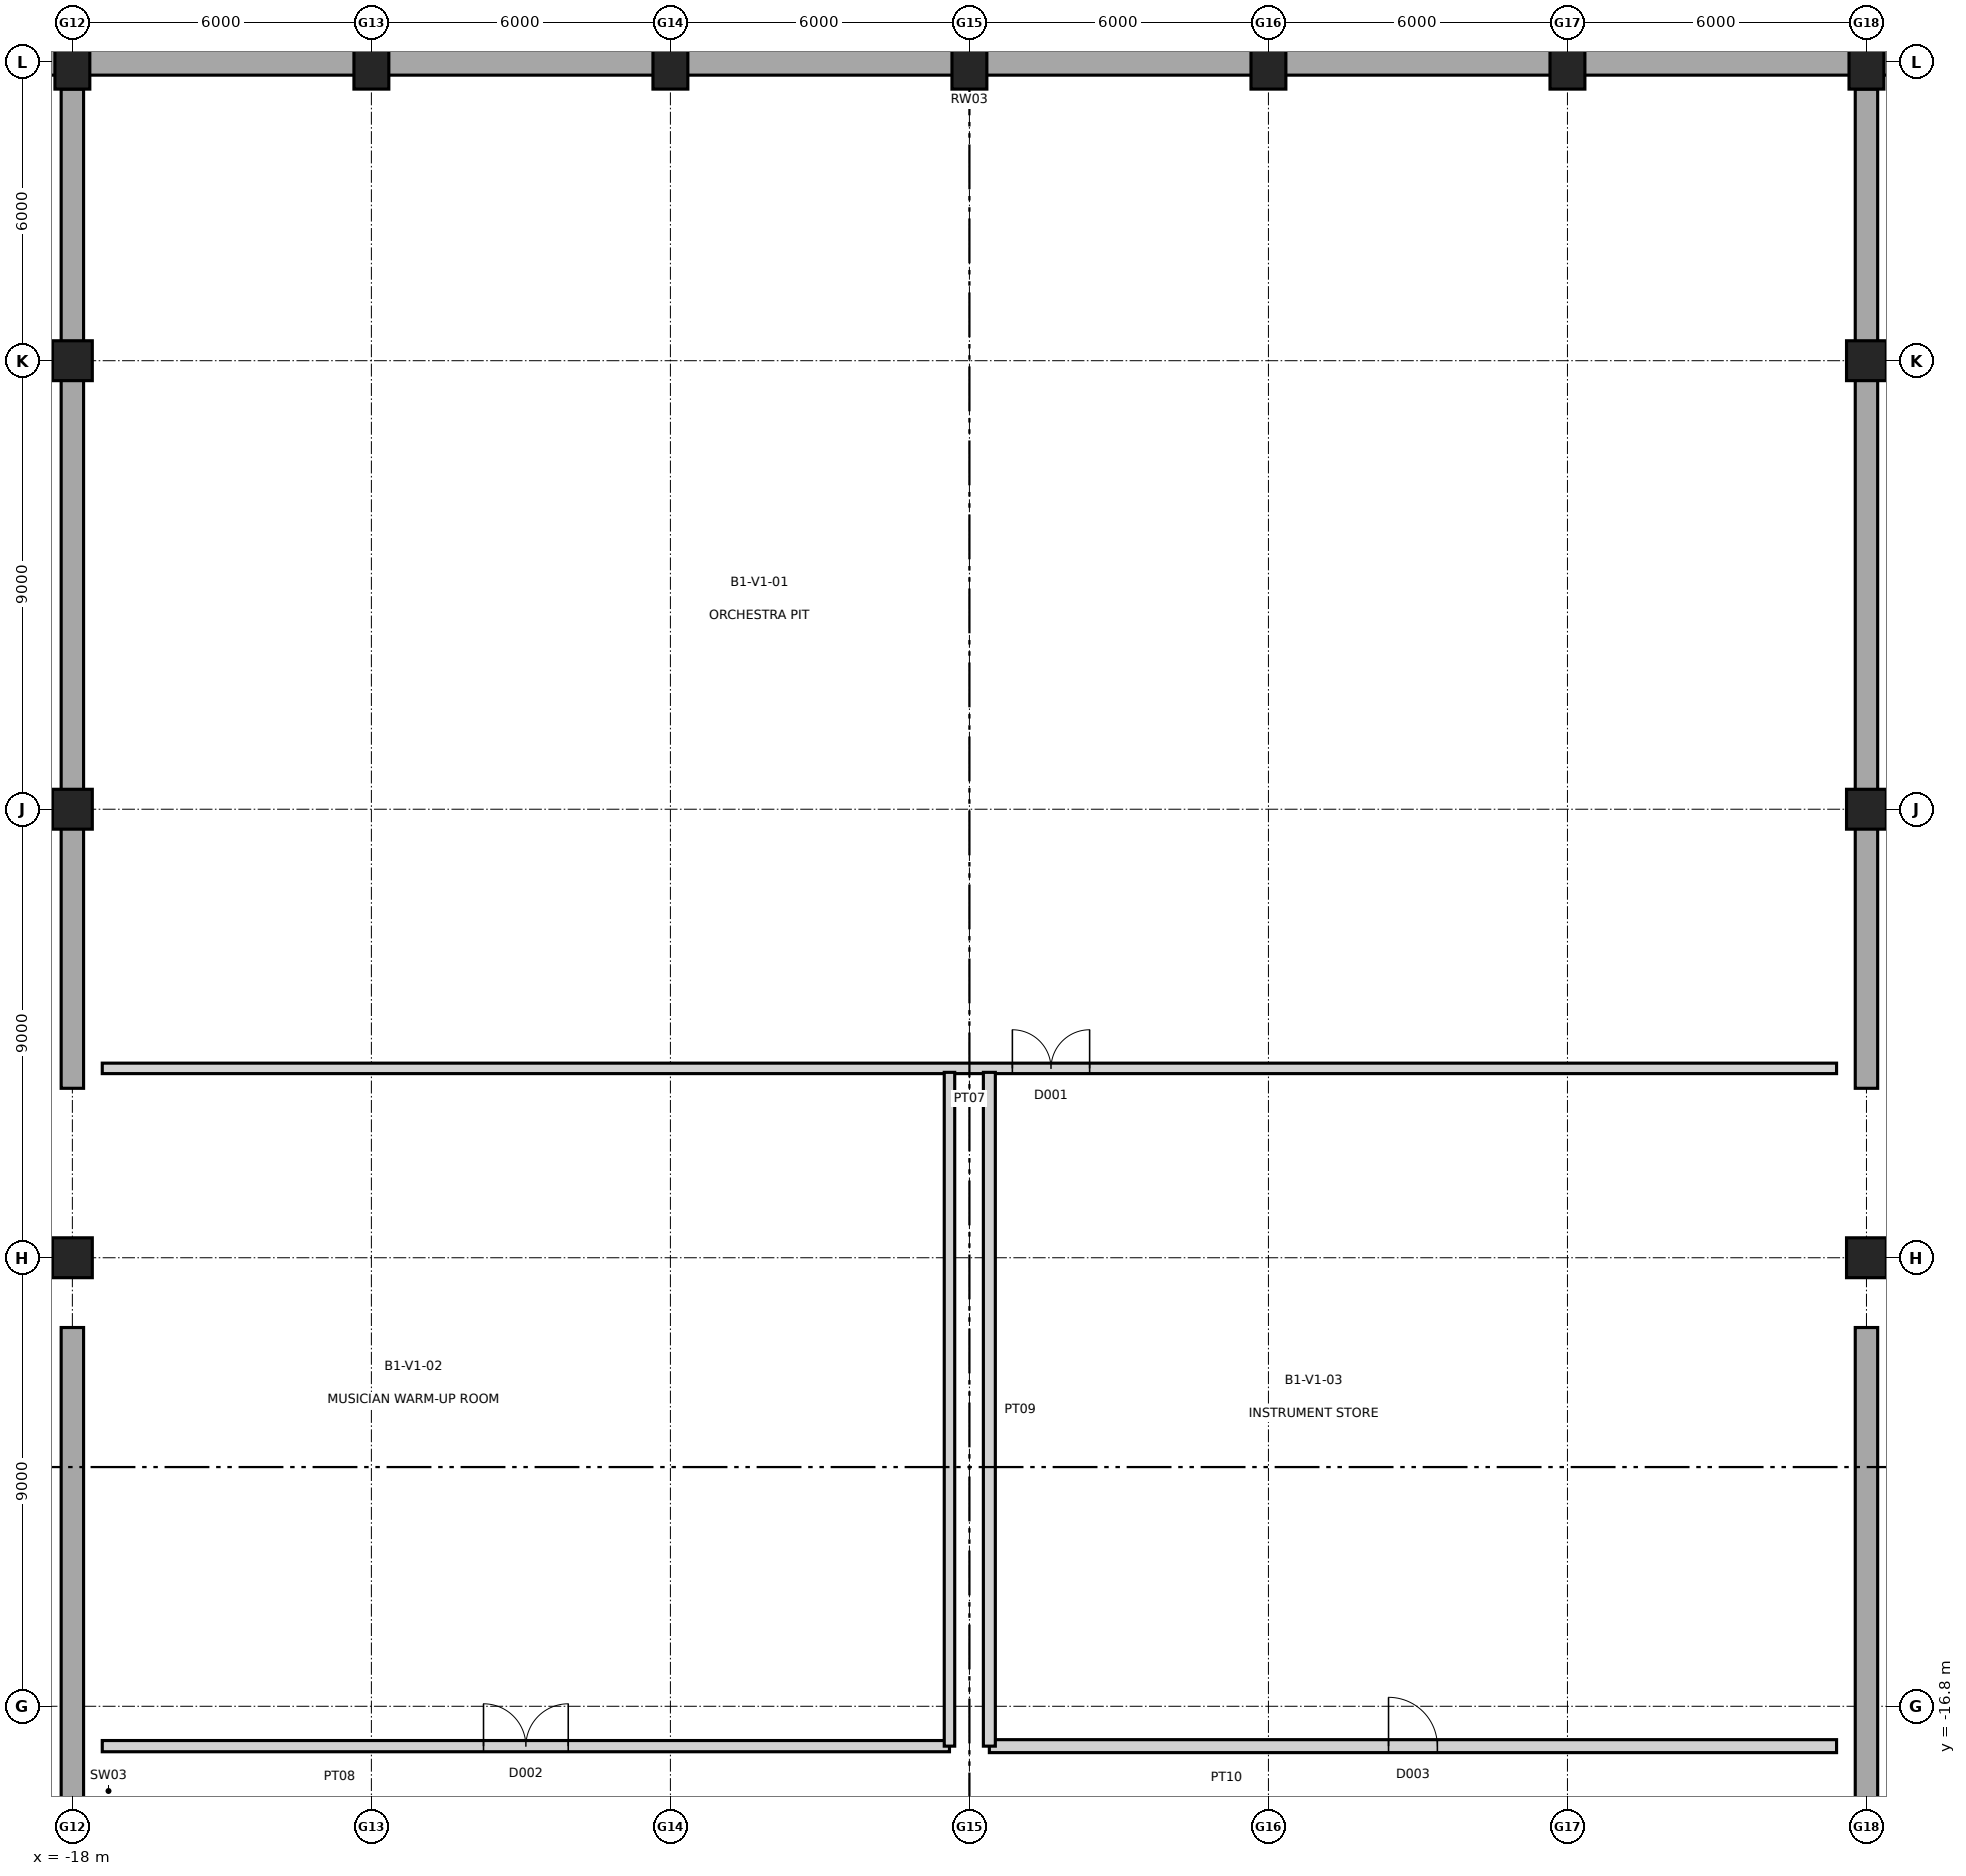
"""IFC4 building model, lengths in metres.
Left out: names, types, materials, properties, quantities, classifications, styles, units other than length and angle.
Written with IfcOpenShell. Run it as: python <this file> out.ifc"""

import sys

from ifc_helpers import new_model, si_unit, direction, frame, frame_2d, origin, origin_2d, place, context, subcontext, project, spatial, rectangle, extrude, element, fill, save


model = new_model("IFC4")
c1 = context("Model", 3, precision=1e-05, world=origin(), true_north=direction((0.0, 1.0)))
c2 = subcontext(c1, "Body", "Model", "MODEL_VIEW")
j1 = project(units=[si_unit("LENGTHUNIT", "METRE"), si_unit("PLANEANGLEUNIT", "RADIAN")], contexts=[c1])
p1 = place(None, origin())
s1 = spatial("IfcSite", under=j1, at=p1, CompositionType="ELEMENT")
p2 = place(p1, origin())
s2 = spatial("IfcBuilding", under=s1, at=p2, CompositionType="ELEMENT")
p3 = place(p2, frame((0.0, 0.0, -5.4)))
s3 = spatial("IfcBuildingStorey", under=s2, at=p3, CompositionType="ELEMENT", Elevation=-5.4)
for number, where, z_axis, x_axis in (
    (1, (-18.0, -7.8, 0.0), (0.0, 0.0, 1.0), (1.0, 0.0, 0.0)),
    (2, (-18.0, 1.2, 0.0), (0.0, 0.0, 1.0), (1.0, 0.0, 0.0)),
    (3, (-18.0, 10.2, 0.0), (0.0, 0.0, 1.0), (1.0, 0.0, 0.0)),
):
    element("IfcColumn", number, at=place(p3, frame(where, z_axis=z_axis, x_axis=x_axis)), inside=s3, PredefinedType="COLUMN", context=c2, shape_type="SweptSolid", body=[
        extrude(rectangle(XDim=0.8, YDim=0.8, at=origin_2d()), origin(), (0.0, 0.0, 1.0), 5.4),
    ])
for number, where, z_axis, x_axis in (
    (4, (-18.0, 16.2, 0.0), (0.0, 0.0, 1.0), (1.0, 0.0, 0.0)),
    (5, (-12.0, 16.2, 0.0), (0.0, 0.0, 1.0), (1.0, 0.0, 0.0)),
    (6, (-6.0, 16.2, 0.0), (0.0, 0.0, 1.0), (1.0, 0.0, 0.0)),
    (7, (0.0, 16.2, 0.0), (0.0, 0.0, 1.0), (1.0, 0.0, 0.0)),
    (8, (6.0, 16.2, 0.0), (0.0, 0.0, 1.0), (1.0, 0.0, 0.0)),
    (9, (12.0, 16.2, 0.0), (0.0, 0.0, 1.0), (1.0, 0.0, 0.0)),
):
    element("IfcColumn", number, at=place(p3, frame(where, z_axis=z_axis, x_axis=x_axis)), inside=s3, PredefinedType="COLUMN", context=c2, shape_type="SweptSolid", body=[
        extrude(rectangle(XDim=0.7, YDim=1.1, at=origin_2d()), origin(), (0.0, 0.0, 1.0), 5.4),
    ])
for number, where, z_axis, x_axis in (
    (10, (18.0, -7.8, 0.0), (0.0, 0.0, 1.0), (1.0, 0.0, 0.0)),
    (11, (18.0, 1.2, 0.0), (0.0, 0.0, 1.0), (1.0, 0.0, 0.0)),
    (12, (18.0, 10.2, 0.0), (0.0, 0.0, 1.0), (1.0, 0.0, 0.0)),
):
    element("IfcColumn", number, at=place(p3, frame(where, z_axis=z_axis, x_axis=x_axis)), inside=s3, PredefinedType="COLUMN", context=c2, shape_type="SweptSolid", body=[
        extrude(rectangle(XDim=0.8, YDim=0.8, at=origin_2d()), origin(), (0.0, 0.0, 1.0), 5.4),
    ])
p4 = place(p3, frame((18.0, 16.2, 0.0), z_axis=(0.0, 0.0, 1.0), x_axis=(1.0, 0.0, 0.0)))
e13 = element("IfcColumn", 13, at=p4, inside=s3, PredefinedType="COLUMN", context=c2, shape_type="SweptSolid", body=[
    extrude(rectangle(XDim=0.7, YDim=1.1, at=origin_2d()), origin(), (0.0, 0.0, 1.0), 5.4),
])
p5 = place(p3, frame((-29.0, 16.2, 0.0), z_axis=(0.0, 0.0, 1.0), x_axis=(1.0, 0.0, 0.0)))
e14 = element("IfcWall", 14, at=p5, inside=s3, PredefinedType="USERDEFINED", context=c2, shape_type="SweptSolid", body=[
    extrude(rectangle(XDim=58.0, YDim=0.54, at=frame_2d((29.0, 0.0))), origin(), (0.0, 0.0, 1.0), 5.11),
])
p6 = place(p3, frame((-18.0, -27.8, 0.0), z_axis=(0.0, 0.0, 1.0), x_axis=(0.0, 1.0, 0.0)))
e15 = element("IfcWall", 15, at=p6, inside=s3, PredefinedType="SHEAR", context=c2, shape_type="SweptSolid", body=[
    extrude(rectangle(XDim=18.6, YDim=0.45, at=frame_2d((9.3, 0.0))), origin(), (0.0, 0.0, 1.0), 5.4),
])
p7 = place(p3, frame((-18.0, -4.4, 0.0), z_axis=(0.0, 0.0, 1.0), x_axis=(0.0, 1.0, 0.0)))
e16 = element("IfcWall", 16, at=p7, inside=s3, PredefinedType="SHEAR", context=c2, shape_type="SweptSolid", body=[
    extrude(rectangle(XDim=20.05, YDim=0.45, at=frame_2d((10.025, 0.0))), origin(), (0.0, 0.0, 1.0), 5.4),
])
p8 = place(p3, frame((18.0, -27.8, 0.0), z_axis=(0.0, 0.0, 1.0), x_axis=(0.0, 1.0, 0.0)))
e17 = element("IfcWall", 17, at=p8, inside=s3, PredefinedType="SHEAR", context=c2, shape_type="SweptSolid", body=[
    extrude(rectangle(XDim=18.6, YDim=0.45, at=frame_2d((9.3, 0.0))), origin(), (0.0, 0.0, 1.0), 5.4),
])
p9 = place(p3, frame((18.0, -4.4, 0.0), z_axis=(0.0, 0.0, 1.0), x_axis=(0.0, 1.0, 0.0)))
e18 = element("IfcWall", 18, at=p9, inside=s3, PredefinedType="SHEAR", context=c2, shape_type="SweptSolid", body=[
    extrude(rectangle(XDim=20.05, YDim=0.45, at=frame_2d((10.025, 0.0))), origin(), (0.0, 0.0, 1.0), 5.4),
])
p10 = place(p3, frame((-17.4, -4.0, 0.0), z_axis=(0.0, 0.0, 1.0), x_axis=(1.0, 0.0, 0.0)))
e19 = element("IfcWall", 19, at=p10, inside=s3, PredefinedType="PARTITIONING", context=c2, shape_type="SweptSolid", body=[
    extrude(rectangle(XDim=34.8, YDim=0.21, at=frame_2d((17.4, 0.0))), origin(), (0.0, 0.0, 1.0), 5.02),
])
p11 = place(p10, frame((18.262, 0.0, 0.0)))
e20 = element("IfcOpeningElement", 20, at=p11, cuts=e19, PredefinedType="OPENING", context=c2, shape_type="SweptSolid", body=[
    extrude(rectangle(XDim=1.55, YDim=2.2, at=frame_2d((0.775, 1.1))), frame((0.0, 0.115, 0.0), z_axis=(0.0, -1.0, 0.0), x_axis=(1.0, 0.0, 0.0)), (0.0, 0.0, 1.0), 0.23),
])
p12 = place(p3, frame((-17.4, -17.6, 0.0), z_axis=(0.0, 0.0, 1.0), x_axis=(1.0, 0.0, 0.0)))
e21 = element("IfcWall", 21, at=p12, inside=s3, PredefinedType="PARTITIONING", context=c2, shape_type="SweptSolid", body=[
    extrude(rectangle(XDim=17.0, YDim=0.225, at=frame_2d((8.5, 0.0))), origin(), (0.0, 0.0, 1.0), 5.02),
])
p13 = place(p12, frame((7.65, 0.0, 0.0)))
e22 = element("IfcOpeningElement", 22, at=p13, cuts=e21, PredefinedType="OPENING", context=c2, shape_type="SweptSolid", body=[
    extrude(rectangle(XDim=1.7, YDim=2.25, at=frame_2d((0.85, 1.125))), frame((0.0, 0.123, 0.0), z_axis=(0.0, -1.0, 0.0), x_axis=(1.0, 0.0, 0.0)), (0.0, 0.0, 1.0), 0.245),
])
p14 = place(p3, frame((-0.4, -17.6, 0.0), z_axis=(0.0, 0.0, 1.0), x_axis=(0.0, 1.0, 0.0)))
e23 = element("IfcWall", 23, at=p14, inside=s3, PredefinedType="PARTITIONING", context=c2, shape_type="SweptSolid", body=[
    extrude(rectangle(XDim=13.52, YDim=0.21, at=frame_2d((6.76, 0.0))), origin(), (0.0, 0.0, 1.0), 5.02),
])
p15 = place(p3, frame((0.4, -17.6, 0.0), z_axis=(0.0, 0.0, 1.0), x_axis=(1.0, 0.0, 0.0)))
e24 = element("IfcWall", 24, at=p15, inside=s3, PredefinedType="PARTITIONING", context=c2, shape_type="SweptSolid", body=[
    extrude(rectangle(XDim=17.0, YDim=0.26, at=frame_2d((8.5, 0.0))), origin(), (0.0, 0.0, 1.0), 5.02),
])
p16 = place(p15, frame((8.01, 0.0, 0.0)))
e25 = element("IfcOpeningElement", 25, at=p16, cuts=e24, PredefinedType="OPENING", context=c2, shape_type="SweptSolid", body=[
    extrude(rectangle(XDim=0.98, YDim=2.15, at=frame_2d((0.49, 1.075))), frame((0.0, 0.14, 0.0), z_axis=(0.0, -1.0, 0.0), x_axis=(1.0, 0.0, 0.0)), (0.0, 0.0, 1.0), 0.28),
])
p17 = place(p3, frame((0.4, -17.6, 0.0), z_axis=(0.0, 0.0, 1.0), x_axis=(0.0, 1.0, 0.0)))
e26 = element("IfcWall", 26, at=p17, inside=s3, PredefinedType="PARTITIONING", context=c2, shape_type="SweptSolid", body=[
    extrude(rectangle(XDim=13.52, YDim=0.24, at=frame_2d((6.76, 0.0))), origin(), (0.0, 0.0, 1.0), 5.02),
])
p18 = place(p11, origin())
e27 = element("IfcDoor", 27, at=p18, inside=s3, OperationType="DOUBLE_DOOR_SINGLE_SWING", PredefinedType="DOOR", context=c2, shape_type="SweptSolid", body=[
    extrude(rectangle(XDim=1.55, YDim=2.2, at=frame_2d((0.775, 1.1))), frame((0.0, 0.025, 0.0), z_axis=(0.0, -1.0, 0.0), x_axis=(1.0, 0.0, 0.0)), (0.0, 0.0, 1.0), 0.05),
])
fill(e20, e27)
p19 = place(p13, origin())
e28 = element("IfcDoor", 28, at=p19, inside=s3, OperationType="DOUBLE_DOOR_SINGLE_SWING", PredefinedType="DOOR", context=c2, shape_type="SweptSolid", body=[
    extrude(rectangle(XDim=1.7, YDim=2.25, at=frame_2d((0.85, 1.125))), frame((0.0, 0.025, 0.0), z_axis=(0.0, -1.0, 0.0), x_axis=(1.0, 0.0, 0.0)), (0.0, 0.0, 1.0), 0.05),
])
fill(e22, e28)
p20 = place(p16, origin())
e29 = element("IfcDoor", 29, at=p20, inside=s3, OperationType="SINGLE_SWING_LEFT", PredefinedType="DOOR", context=c2, shape_type="SweptSolid", body=[
    extrude(rectangle(XDim=0.98, YDim=2.15, at=frame_2d((0.49, 1.075))), frame((0.0, 0.025, 0.0), z_axis=(0.0, -1.0, 0.0), x_axis=(1.0, 0.0, 0.0)), (0.0, 0.0, 1.0), 0.05),
])
fill(e25, e29)
save(model, sys.argv[1])
